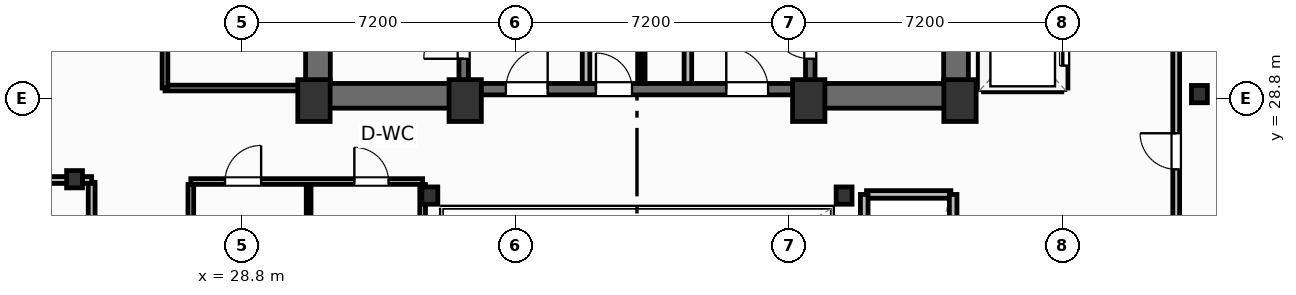
"""IFC4 building model, lengths in metres.
Left out: names, types, materials, properties, quantities, classifications, styles, units other than length and angle.
Written with IfcOpenShell. Run it as: python <this file> out.ifc"""

import sys

from ifc_helpers import new_model, si_unit, direction, frame, frame_2d, origin, origin_2d, place, context, subcontext, project, spatial, rectangle, i_section, extrude, element, fill, save


model = new_model("IFC4")
c1 = context("Model", 3, precision=1e-05, world=origin(), true_north=direction((0.0, 1.0)))
c2 = subcontext(c1, "Body", "Model", "MODEL_VIEW")
j1 = project(units=[si_unit("LENGTHUNIT", "METRE"), si_unit("PLANEANGLEUNIT", "RADIAN")], contexts=[c1])
p1 = place(None, origin())
s1 = spatial("IfcSite", under=j1, at=p1, CompositionType="ELEMENT")
p2 = place(p1, origin())
s2 = spatial("IfcBuilding", under=s1, at=p2, CompositionType="ELEMENT")
p3 = place(p2, frame((0.0, 0.0, 200.5)))
s3 = spatial("IfcBuildingStorey", under=s2, at=p3, CompositionType="ELEMENT", Elevation=200.5)
for number, where, z_axis, x_axis in (
    (1, (30.7, 28.75, 0.0), (0.0, 0.0, 1.0), (1.0, 0.0, 0.0)),
    (2, (34.68, 28.75, 0.0), (0.0, 0.0, 1.0), (1.0, 0.0, 0.0)),
    (3, (43.72, 28.75, 0.0), (0.0, 0.0, 1.0), (1.0, 0.0, 0.0)),
    (4, (47.7, 28.75, 0.0), (0.0, 0.0, 1.0), (1.0, 0.0, 0.0)),
):
    element("IfcColumn", number, at=place(p3, frame(where, z_axis=z_axis, x_axis=x_axis)), inside=s3, PredefinedType="COLUMN", context=c2, shape_type="SweptSolid", body=[
        extrude(rectangle(XDim=0.85, YDim=1.1, at=origin_2d()), origin(), (0.0, 0.0, 1.0), 3.7),
    ])
for number, where, z_axis, x_axis in (
    (5, (33.75, 26.25, 0.0), (0.0, 0.0, 1.0), (1.0, 0.0, 0.0)),
    (6, (44.65, 26.25, 0.0), (0.0, 0.0, 1.0), (1.0, 0.0, 0.0)),
    (7, (24.4, 26.68, 0.0), (0.0, 0.0, 1.0), (1.0, 0.0, 0.0)),
    (8, (54.0, 28.92, 0.0), (0.0, 0.0, 1.0), (1.0, 0.0, 0.0)),
):
    element("IfcColumn", number, at=place(p3, frame(where, z_axis=z_axis, x_axis=x_axis)), inside=s3, PredefinedType="COLUMN", context=c2, shape_type="SweptSolid", body=[
        extrude(i_section(OverallWidth=0.418, OverallDepth=0.455, WebThickness=0.042, FlangeThickness=0.068, FilletRadius=0.025, at=origin_2d()), origin(), (0.0, 0.0, 1.0), 3.7),
    ])
for number, where, z_axis, x_axis in (
    (9, (30.805, 29.2, 0.0), (0.0, 0.0, 1.0), (0.0, 1.0, 0.0)),
    (10, (47.595, 29.2, 0.0), (0.0, 0.0, 1.0), (0.0, 1.0, 0.0)),
):
    element("IfcWall", number, at=place(p3, frame(where, z_axis=z_axis, x_axis=x_axis)), inside=s3, PredefinedType="SHEAR", context=c2, shape_type="SweptSolid", body=[
        extrude(rectangle(XDim=9.22, YDim=0.65, at=frame_2d((4.61, 0.0))), origin(), (0.0, 0.0, 1.0), 3.45),
    ])
p4 = place(p3, frame((30.48, 28.875, 0.0), z_axis=(0.0, 0.0, 1.0), x_axis=(1.0, 0.0, 0.0)))
e11 = element("IfcWall", 11, at=p4, inside=s3, PredefinedType="SHEAR", context=c2, shape_type="SweptSolid", body=[
    extrude(rectangle(XDim=4.32, YDim=0.65, at=frame_2d((2.16, 0.0))), origin(), (0.0, 0.0, 1.0), 3.45),
])
p5 = place(p3, frame((43.6, 28.875, 0.0), z_axis=(0.0, 0.0, 1.0), x_axis=(1.0, 0.0, 0.0)))
e12 = element("IfcWall", 12, at=p5, inside=s3, PredefinedType="SHEAR", context=c2, shape_type="SweptSolid", body=[
    extrude(rectangle(XDim=4.32, YDim=0.65, at=frame_2d((2.16, 0.0))), origin(), (0.0, 0.0, 1.0), 3.45),
])
p6 = place(p3, frame((34.8, 29.05, 0.0), z_axis=(0.0, 0.0, 1.0), x_axis=(1.0, 0.0, 0.0)))
e13 = element("IfcWall", 13, at=p6, inside=s3, PredefinedType="SHEAR", context=c2, shape_type="SweptSolid", body=[
    extrude(rectangle(XDim=8.8, YDim=0.3, at=frame_2d((4.4, 0.0))), origin(), (0.0, 0.0, 1.0), 3.45),
])
p7 = place(p6, frame((0.95, 0.0, 0.0)))
e14 = element("IfcOpeningElement", 14, at=p7, cuts=e13, PredefinedType="OPENING", context=c2, shape_type="SweptSolid", body=[
    extrude(rectangle(XDim=1.1, YDim=2.15, at=frame_2d((0.55, 1.075))), frame((0.0, 0.16, 0.0), z_axis=(0.0, -1.0, 0.0), x_axis=(1.0, 0.0, 0.0)), (0.0, 0.0, 1.0), 0.32),
])
p8 = place(p6, frame((6.75, 0.0, 0.0)))
e15 = element("IfcOpeningElement", 15, at=p8, cuts=e13, PredefinedType="OPENING", context=c2, shape_type="SweptSolid", body=[
    extrude(rectangle(XDim=1.1, YDim=2.15, at=frame_2d((0.55, 1.075))), frame((0.0, 0.16, 0.0), z_axis=(0.0, -1.0, 0.0), x_axis=(1.0, 0.0, 0.0)), (0.0, 0.0, 1.0), 0.32),
])
p9 = place(p6, frame((3.32, 0.0, 0.0)))
e16 = element("IfcOpeningElement", 16, at=p9, cuts=e13, PredefinedType="OPENING", context=c2, shape_type="SweptSolid", body=[
    extrude(rectangle(XDim=0.95, YDim=2.15, at=frame_2d((0.475, 1.075))), frame((0.0, 0.16, 0.0), z_axis=(0.0, -1.0, 0.0), x_axis=(1.0, 0.0, 0.0)), (0.0, 0.0, 1.0), 0.32),
])
p10 = place(p3, frame((34.64, 29.2, 0.0), z_axis=(0.0, 0.0, 1.0), x_axis=(0.0, 1.0, 0.0)))
e17 = element("IfcWall", 17, at=p10, inside=s3, PredefinedType="SHEAR", context=c2, shape_type="SweptSolid", body=[
    extrude(rectangle(XDim=9.22, YDim=0.25, at=frame_2d((4.61, 0.0))), origin(), (0.0, 0.0, 1.0), 3.45),
])
p11 = place(p10, frame((0.65, 0.0, 0.0)))
e18 = element("IfcOpeningElement", 18, at=p11, cuts=e17, PredefinedType="OPENING", context=c2, shape_type="SweptSolid", body=[
    extrude(rectangle(XDim=1.05, YDim=2.15, at=frame_2d((0.525, 1.075))), frame((0.0, 0.135, 0.0), z_axis=(0.0, -1.0, 0.0), x_axis=(1.0, 0.0, 0.0)), (0.0, 0.0, 1.0), 0.27),
])
p12 = place(p3, frame((43.76, 29.2, 0.0), z_axis=(0.0, 0.0, 1.0), x_axis=(0.0, 1.0, 0.0)))
e19 = element("IfcWall", 19, at=p12, inside=s3, PredefinedType="SHEAR", context=c2, shape_type="SweptSolid", body=[
    extrude(rectangle(XDim=9.22, YDim=0.25, at=frame_2d((4.61, 0.0))), origin(), (0.0, 0.0, 1.0), 3.45),
])
p13 = place(p12, frame((0.65, 0.0, 0.0)))
e20 = element("IfcOpeningElement", 20, at=p13, cuts=e19, PredefinedType="OPENING", context=c2, shape_type="SweptSolid", body=[
    extrude(rectangle(XDim=1.05, YDim=2.15, at=frame_2d((0.525, 1.075))), frame((0.0, 0.135, 0.0), z_axis=(0.0, -1.0, 0.0), x_axis=(1.0, 0.0, 0.0)), (0.0, 0.0, 1.0), 0.27),
])
p14 = place(p3, frame((24.85, 23.03, 0.0), z_axis=(0.0, 0.0, 1.0), x_axis=(0.0, 1.0, 0.0)))
e21 = element("IfcWall", 21, at=p14, inside=s3, PredefinedType="PARTITIONING", context=c2, shape_type="SweptSolid", body=[
    extrude(rectangle(XDim=3.57, YDim=0.18, at=frame_2d((1.785, 0.0))), origin(), (0.0, 0.0, 1.0), 3.45),
])
p15 = place(p14, frame((1.5, 0.0, 0.0)))
e22 = element("IfcOpeningElement", 22, at=p15, cuts=e21, PredefinedType="OPENING", context=c2, shape_type="SweptSolid", body=[
    extrude(rectangle(XDim=0.92, YDim=2.05, at=frame_2d((0.46, 1.025))), frame((0.0, 0.1, 0.0), z_axis=(0.0, -1.0, 0.0), x_axis=(1.0, 0.0, 0.0)), (0.0, 0.0, 1.0), 0.2),
])
p16 = place(p3, frame((3.658, 26.66, 0.0), z_axis=(0.0, 0.0, 1.0), x_axis=(1.0, 0.0, 0.0)))
e23 = element("IfcWall", 23, at=p16, inside=s3, PredefinedType="PARTITIONING", context=c2, shape_type="SweptSolid", body=[
    extrude(rectangle(XDim=21.192, YDim=0.18, at=frame_2d((10.596, 0.0))), origin(), (0.0, 0.0, 1.0), 2.662),
])
p17 = place(p3, frame((53.39, 19.24, 0.0), z_axis=(0.0, 0.0, 1.0), x_axis=(0.0, 1.0, 0.0)))
e24 = element("IfcWall", 24, at=p17, inside=s3, PredefinedType="PARTITIONING", context=c2, shape_type="SweptSolid", body=[
    extrude(rectangle(XDim=20.06, YDim=0.18, at=frame_2d((10.03, 0.0))), origin(), (0.0, 0.0, 1.0), 3.45),
])
p18 = place(p17, frame((7.7, 0.0, 0.0)))
e25 = element("IfcOpeningElement", 25, at=p18, cuts=e24, PredefinedType="OPENING", context=c2, shape_type="SweptSolid", body=[
    extrude(rectangle(XDim=0.95, YDim=2.05, at=frame_2d((0.475, 1.025))), frame((0.0, 0.1, 0.0), z_axis=(0.0, -1.0, 0.0), x_axis=(1.0, 0.0, 0.0)), (0.0, 0.0, 1.0), 0.2),
])
for number, where, z_axis, x_axis in (
    (26, (37.86, 29.2, 0.0), (0.0, 0.0, 1.0), (0.0, 1.0, 0.0)),
    (27, (40.54, 29.2, 0.0), (0.0, 0.0, 1.0), (0.0, 1.0, 0.0)),
):
    element("IfcWall", number, at=place(p3, frame(where, z_axis=z_axis, x_axis=x_axis)), inside=s3, PredefinedType="PARTITIONING", context=c2, shape_type="SweptSolid", body=[
        extrude(rectangle(XDim=5.18, YDim=0.2, at=frame_2d((2.59, 0.0))), origin(), (0.0, 0.0, 1.0), 3.45),
    ])
p19 = place(p3, frame((39.35, 29.2, 0.0), z_axis=(0.0, 0.0, 1.0), x_axis=(0.0, 1.0, 0.0)))
e28 = element("IfcWall", 28, at=p19, inside=s3, PredefinedType="PARTITIONING", context=c2, shape_type="SweptSolid", body=[
    extrude(rectangle(XDim=5.22, YDim=0.125, at=frame_2d((2.61, 0.0))), origin(), (0.0, 0.0, 1.0), 3.45),
])
p20 = place(p19, frame((2.05, 0.0, 0.0)))
e29 = element("IfcOpeningElement", 29, at=p20, cuts=e28, PredefinedType="OPENING", context=c2, shape_type="SweptSolid", body=[
    extrude(rectangle(XDim=0.85, YDim=2.05, at=frame_2d((0.425, 1.025))), frame((0.0, 0.073, 0.0), z_axis=(0.0, -1.0, 0.0), x_axis=(1.0, 0.0, 0.0)), (0.0, 0.0, 1.0), 0.145),
])
p21 = place(p3, frame((27.46, 26.62, 0.0), z_axis=(0.0, 0.0, 1.0), x_axis=(1.0, 0.0, 0.0)))
e30 = element("IfcWall", 30, at=p21, inside=s3, PredefinedType="PARTITIONING", context=c2, shape_type="SweptSolid", body=[
    extrude(rectangle(XDim=6.1, YDim=0.15, at=frame_2d((3.05, 0.0))), origin(), (0.0, 0.0, 1.0), 2.662),
])
p22 = place(p21, frame((0.9, 0.0, 0.0)))
e31 = element("IfcOpeningElement", 31, at=p22, cuts=e30, PredefinedType="OPENING", context=c2, shape_type="SweptSolid", body=[
    extrude(rectangle(XDim=0.95, YDim=2.05, at=frame_2d((0.475, 1.025))), frame((0.0, 0.085, 0.0), z_axis=(0.0, -1.0, 0.0), x_axis=(1.0, 0.0, 0.0)), (0.0, 0.0, 1.0), 0.17),
])
p23 = place(p21, frame((4.303, 0.0, 0.0)))
e32 = element("IfcOpeningElement", 32, at=p23, cuts=e30, PredefinedType="OPENING", context=c2, shape_type="SweptSolid", body=[
    extrude(rectangle(XDim=0.9, YDim=2.05, at=frame_2d((0.45, 1.025))), frame((0.0, 0.085, 0.0), z_axis=(0.0, -1.0, 0.0), x_axis=(1.0, 0.0, 0.0)), (0.0, 0.0, 1.0), 0.17),
])
p24 = place(p3, frame((30.56, 19.38, 0.0), z_axis=(0.0, 0.0, 1.0), x_axis=(0.0, 1.0, 0.0)))
e33 = element("IfcWall", 33, at=p24, inside=s3, PredefinedType="PARTITIONING", context=c2, shape_type="SweptSolid", body=[
    extrude(rectangle(XDim=7.16, YDim=0.125, at=frame_2d((3.58, 0.0))), origin(), (0.0, 0.0, 1.0), 3.45),
])
p25 = place(p24, frame((1.4, 0.0, 0.0)))
e34 = element("IfcOpeningElement", 34, at=p25, cuts=e33, PredefinedType="OPENING", context=c2, shape_type="SweptSolid", body=[
    extrude(rectangle(XDim=0.92, YDim=2.05, at=frame_2d((0.46, 1.025))), frame((0.0, 0.073, 0.0), z_axis=(0.0, -1.0, 0.0), x_axis=(1.0, 0.0, 0.0)), (0.0, 0.0, 1.0), 0.145),
])
p26 = place(p3, frame((27.46, 19.38, 0.0), z_axis=(0.0, 0.0, 1.0), x_axis=(0.0, 1.0, 0.0)))
e35 = element("IfcWall", 35, at=p26, inside=s3, PredefinedType="PARTITIONING", context=c2, shape_type="SweptSolid", body=[
    extrude(rectangle(XDim=7.16, YDim=0.15, at=frame_2d((3.58, 0.0))), origin(), (0.0, 0.0, 1.0), 3.45),
])
p27 = place(p3, frame((33.56, 19.38, 0.0), z_axis=(0.0, 0.0, 1.0), x_axis=(0.0, 1.0, 0.0)))
e36 = element("IfcWall", 36, at=p27, inside=s3, PredefinedType="PARTITIONING", context=c2, shape_type="SweptSolid", body=[
    extrude(rectangle(XDim=7.16, YDim=0.15, at=frame_2d((3.58, 0.0))), origin(), (0.0, 0.0, 1.0), 2.824),
])
p28 = place(p3, frame((26.78, 29.08, 0.0), z_axis=(0.0, 0.0, 1.0), x_axis=(1.0, 0.0, 0.0)))
e37 = element("IfcWall", 37, at=p28, inside=s3, PredefinedType="PARTITIONING", context=c2, shape_type="SweptSolid", body=[
    extrude(rectangle(XDim=3.7, YDim=0.15, at=frame_2d((1.85, 0.0))), origin(), (0.0, 0.0, 1.0), 3.45),
])
p29 = place(p3, frame((26.78, 29.08, 0.0), z_axis=(0.0, 0.0, 1.0), x_axis=(0.0, 1.0, 0.0)))
e38 = element("IfcWall", 38, at=p29, inside=s3, PredefinedType="PARTITIONING", context=c2, shape_type="SweptSolid", body=[
    extrude(rectangle(XDim=9.18, YDim=0.15, at=frame_2d((4.59, 0.0))), origin(), (0.0, 0.0, 1.0), 3.45),
])
p30 = place(p29, frame((2.4, 0.0, 0.0)))
e39 = element("IfcOpeningElement", 39, at=p30, cuts=e38, PredefinedType="OPENING", context=c2, shape_type="SweptSolid", body=[
    extrude(rectangle(XDim=0.95, YDim=2.05, at=frame_2d((0.475, 1.025))), frame((0.0, 0.085, 0.0), z_axis=(0.0, -1.0, 0.0), x_axis=(1.0, 0.0, 0.0)), (0.0, 0.0, 1.0), 0.17),
])
p31 = place(p3, frame((48.32, 29.08, 0.0), z_axis=(0.0, 0.0, 1.0), x_axis=(1.0, 0.0, 0.0)))
e40 = element("IfcWall", 40, at=p31, inside=s3, PredefinedType="PARTITIONING", context=c2, shape_type="SweptSolid", body=[
    extrude(rectangle(XDim=2.06, YDim=0.2, at=frame_2d((1.03, 0.0))), origin(), (0.0, 0.0, 1.0), 2.662),
])
p32 = place(p3, frame((48.28, 29.08, 0.0), z_axis=(0.0, 0.0, 1.0), x_axis=(0.0, 1.0, 0.0)))
e41 = element("IfcWall", 41, at=p32, inside=s3, PredefinedType="PARTITIONING", context=c2, shape_type="SweptSolid", body=[
    extrude(rectangle(XDim=6.89, YDim=0.2, at=frame_2d((3.445, 0.0))), origin(), (0.0, 0.0, 1.0), 3.45),
])
p33 = place(p3, frame((50.44, 29.08, 0.0), z_axis=(0.0, 0.0, 1.0), x_axis=(0.0, 1.0, 0.0)))
e42 = element("IfcWall", 42, at=p33, inside=s3, PredefinedType="PARTITIONING", context=c2, shape_type="SweptSolid", body=[
    extrude(rectangle(XDim=6.89, YDim=0.2, at=frame_2d((3.445, 0.0))), origin(), (0.0, 0.0, 1.0), 3.45),
])
p34 = place(p33, frame((0.59, 0.0, 0.0)))
e43 = element("IfcOpeningElement", 43, at=p34, cuts=e42, PredefinedType="OPENING", context=c2, shape_type="SweptSolid", body=[
    extrude(rectangle(XDim=1.1, YDim=2.15, at=frame_2d((0.55, 1.075))), frame((0.0, 0.11, 0.0), z_axis=(0.0, -1.0, 0.0), x_axis=(1.0, 0.0, 0.0)), (0.0, 0.0, 1.0), 0.22),
])
p35 = place(p33, frame((2.89, 0.0, 0.0)))
e44 = element("IfcOpeningElement", 44, at=p35, cuts=e42, PredefinedType="OPENING", context=c2, shape_type="SweptSolid", body=[
    extrude(rectangle(XDim=1.1, YDim=2.15, at=frame_2d((0.55, 1.075))), frame((0.0, 0.11, 0.0), z_axis=(0.0, -1.0, 0.0), x_axis=(1.0, 0.0, 0.0)), (0.0, 0.0, 1.0), 0.22),
])
p36 = place(p33, frame((5.19, 0.0, 0.0)))
e45 = element("IfcOpeningElement", 45, at=p36, cuts=e42, PredefinedType="OPENING", context=c2, shape_type="SweptSolid", body=[
    extrude(rectangle(XDim=1.1, YDim=2.15, at=frame_2d((0.55, 1.075))), frame((0.0, 0.11, 0.0), z_axis=(0.0, -1.0, 0.0), x_axis=(1.0, 0.0, 0.0)), (0.0, 0.0, 1.0), 0.22),
])
p37 = place(p3, frame((45.24, 26.28, 0.0), z_axis=(0.0, 0.0, 1.0), x_axis=(1.0, 0.0, 0.0)))
e46 = element("IfcWall", 46, at=p37, inside=s3, PredefinedType="PARTITIONING", context=c2, shape_type="SweptSolid", body=[
    extrude(rectangle(XDim=2.22, YDim=0.2, at=frame_2d((1.11, 0.0))), origin(), (0.0, 0.0, 1.0), 3.45),
])
for number, where, z_axis, x_axis in (
    (47, (45.18, 19.38, 0.0), (0.0, 0.0, 1.0), (0.0, 1.0, 0.0)),
    (48, (47.52, 19.38, 0.0), (0.0, 0.0, 1.0), (0.0, 1.0, 0.0)),
):
    element("IfcWall", number, at=place(p3, frame(where, z_axis=z_axis, x_axis=x_axis)), inside=s3, PredefinedType="PARTITIONING", context=c2, shape_type="SweptSolid", body=[
        extrude(rectangle(XDim=6.9, YDim=0.2, at=frame_2d((3.45, 0.0))), origin(), (0.0, 0.0, 1.0), 3.45),
    ])
p38 = place(p18, origin())
e49 = element("IfcDoor", 49, at=p38, inside=s3, OperationType="SINGLE_SWING_RIGHT", PredefinedType="DOOR", context=c2, shape_type="SweptSolid", body=[
    extrude(rectangle(XDim=0.95, YDim=2.05, at=frame_2d((0.475, 1.025))), frame((0.0, 0.025, 0.0), z_axis=(0.0, -1.0, 0.0), x_axis=(1.0, 0.0, 0.0)), (0.0, 0.0, 1.0), 0.05),
])
fill(e25, e49)
p39 = place(p11, origin())
e50 = element("IfcDoor", 50, at=p39, inside=s3, OperationType="SINGLE_SWING_LEFT", PredefinedType="DOOR", context=c2, shape_type="SweptSolid", body=[
    extrude(rectangle(XDim=1.05, YDim=2.15, at=frame_2d((0.525, 1.075))), frame((0.0, 0.025, 0.0), z_axis=(0.0, -1.0, 0.0), x_axis=(1.0, 0.0, 0.0)), (0.0, 0.0, 1.0), 0.05),
])
fill(e18, e50)
p40 = place(p13, origin())
e51 = element("IfcDoor", 51, at=p40, inside=s3, OperationType="SINGLE_SWING_RIGHT", PredefinedType="DOOR", context=c2, shape_type="SweptSolid", body=[
    extrude(rectangle(XDim=1.05, YDim=2.15, at=frame_2d((0.525, 1.075))), frame((0.0, 0.025, 0.0), z_axis=(0.0, -1.0, 0.0), x_axis=(1.0, 0.0, 0.0)), (0.0, 0.0, 1.0), 0.05),
])
fill(e20, e51)
p41 = place(p7, origin())
e52 = element("IfcDoor", 52, at=p41, inside=s3, OperationType="SINGLE_SWING_RIGHT", PredefinedType="DOOR", context=c2, shape_type="SweptSolid", body=[
    extrude(rectangle(XDim=1.1, YDim=2.15, at=frame_2d((0.55, 1.075))), frame((0.0, 0.025, 0.0), z_axis=(0.0, -1.0, 0.0), x_axis=(1.0, 0.0, 0.0)), (0.0, 0.0, 1.0), 0.05),
])
fill(e14, e52)
p42 = place(p8, origin())
e53 = element("IfcDoor", 53, at=p42, inside=s3, OperationType="SINGLE_SWING_LEFT", PredefinedType="DOOR", context=c2, shape_type="SweptSolid", body=[
    extrude(rectangle(XDim=1.1, YDim=2.15, at=frame_2d((0.55, 1.075))), frame((0.0, 0.025, 0.0), z_axis=(0.0, -1.0, 0.0), x_axis=(1.0, 0.0, 0.0)), (0.0, 0.0, 1.0), 0.05),
])
fill(e15, e53)
p43 = place(p9, origin())
e54 = element("IfcDoor", 54, at=p43, inside=s3, OperationType="SINGLE_SWING_LEFT", PredefinedType="DOOR", context=c2, shape_type="SweptSolid", body=[
    extrude(rectangle(XDim=0.95, YDim=2.15, at=frame_2d((0.475, 1.075))), frame((0.0, 0.025, 0.0), z_axis=(0.0, -1.0, 0.0), x_axis=(1.0, 0.0, 0.0)), (0.0, 0.0, 1.0), 0.05),
])
fill(e16, e54)
p44 = place(p22, origin())
e55 = element("IfcDoor", 55, at=p44, inside=s3, OperationType="SINGLE_SWING_RIGHT", PredefinedType="DOOR", context=c2, shape_type="SweptSolid", body=[
    extrude(rectangle(XDim=0.95, YDim=2.05, at=frame_2d((0.475, 1.025))), frame((0.0, 0.025, 0.0), z_axis=(0.0, -1.0, 0.0), x_axis=(1.0, 0.0, 0.0)), (0.0, 0.0, 1.0), 0.05),
])
fill(e31, e55)
p45 = place(p23, origin())
e56 = element("IfcDoor", 56, at=p45, inside=s3, OperationType="SINGLE_SWING_LEFT", PredefinedType="DOOR", context=c2, shape_type="SweptSolid", body=[
    extrude(rectangle(XDim=0.9, YDim=2.05, at=frame_2d((0.45, 1.025))), frame((0.0, 0.025, 0.0), z_axis=(0.0, -1.0, 0.0), x_axis=(1.0, 0.0, 0.0)), (0.0, 0.0, 1.0), 0.05),
])
fill(e32, e56)
p46 = place(p34, origin())
e57 = element("IfcDoor", 57, at=p46, inside=s3, OperationType="SLIDING_TO_LEFT", PredefinedType="DOOR", context=c2, shape_type="SweptSolid", body=[
    extrude(rectangle(XDim=1.1, YDim=2.15, at=frame_2d((0.55, 1.075))), frame((0.0, 0.025, 0.0), z_axis=(0.0, -1.0, 0.0), x_axis=(1.0, 0.0, 0.0)), (0.0, 0.0, 1.0), 0.05),
])
fill(e43, e57)
save(model, sys.argv[1])
